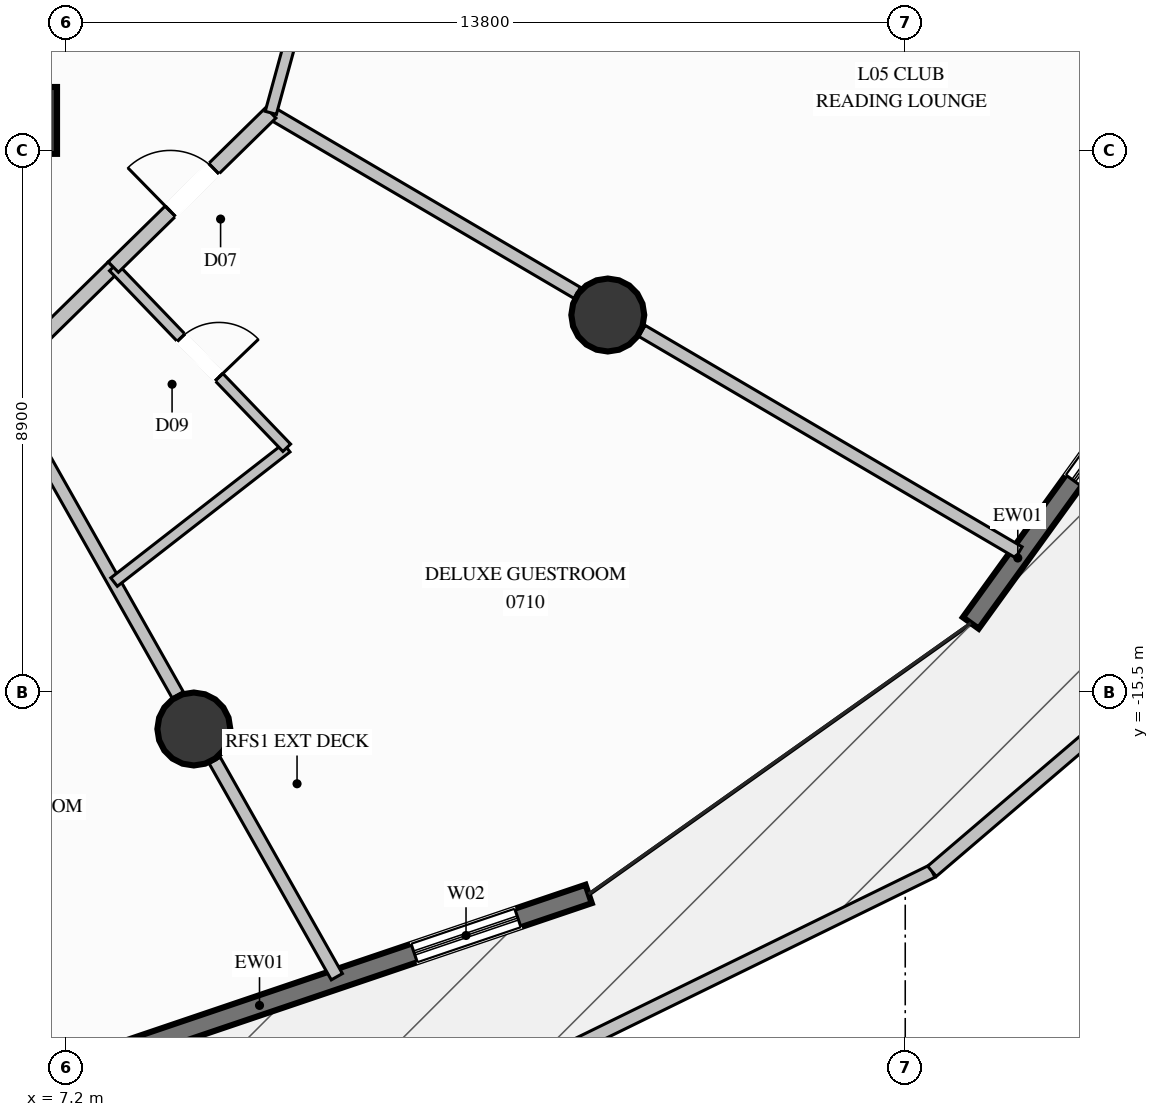
"""IFC4 building model, lengths in metres.
Left out: names, types, materials, properties, quantities, classifications, styles, units other than length and angle.
Written with IfcOpenShell. Run it as: python <this file> out.ifc"""

import sys

from ifc_helpers import new_model, si_unit, direction, frame, frame_2d, origin, origin_2d, place, context, subcontext, project, spatial, rectangle, circle, extrude, element, fill, save


model = new_model("IFC4")
c1 = context("Model", 3, precision=1e-05, world=origin(), true_north=direction((0.0, 1.0)))
c2 = subcontext(c1, "Body", "Model", "MODEL_VIEW")
j1 = project(units=[si_unit("LENGTHUNIT", "METRE"), si_unit("PLANEANGLEUNIT", "RADIAN")], contexts=[c1])
p1 = place(None, origin())
s1 = spatial("IfcSite", under=j1, at=p1, CompositionType="ELEMENT")
p2 = place(p1, origin())
s2 = spatial("IfcBuilding", under=s1, at=p2, CompositionType="ELEMENT")
p3 = place(p2, frame((0.0, 0.0, 28.4)))
s3 = spatial("IfcBuildingStorey", under=s2, at=p3, CompositionType="ELEMENT", Elevation=28.4)
p4 = place(p3, frame((6.5, -6.1, 0.0), z_axis=(0.0, 0.0, 1.0), x_axis=(1.0, 0.0, 0.0)))
e1 = element("IfcColumn", 1, at=p4, inside=s3, PredefinedType="COLUMN", context=c2, shape_type="SweptSolid", body=[
    extrude(rectangle(XDim=1.1, YDim=1.1, at=origin_2d()), origin(), (0.0, 0.0, 1.0), 3.6),
])
for number, where, z_axis, x_axis in (
    (2, (9.3, -16.108, 0.0), (0.0, 0.0, 1.0), (1.0, 0.0, 0.0)),
    (3, (16.108, -9.3, 0.0), (0.0, 0.0, 1.0), (1.0, 0.0, 0.0)),
):
    element("IfcColumn", number, at=place(p3, frame(where, z_axis=z_axis, x_axis=x_axis)), inside=s3, PredefinedType="COLUMN", context=c2, shape_type="SweptSolid", body=[
        extrude(circle(Radius=0.6, at=origin_2d()), origin(), (0.0, 0.0, 1.0), 3.6),
    ])
p5 = place(p3, frame((15.793, -18.821, 0.0), z_axis=(0.0, 0.0, 1.0), x_axis=(-0.94717495877, -0.320717317085, 0.0)))
e4 = element("IfcWall", 4, at=p5, inside=s3, PredefinedType="SOLIDWALL", context=c2, shape_type="SweptSolid", body=[
    extrude(rectangle(XDim=8.151, YDim=0.32, at=frame_2d((4.075, 0.0))), origin(), (0.0, 0.0, 1.0), 3.34),
])
p6 = place(p5, frame((1.229, 0.0, 0.35)))
e5 = element("IfcOpeningElement", 5, at=p6, cuts=e4, PredefinedType="OPENING", context=c2, shape_type="SweptSolid", body=[
    extrude(rectangle(XDim=1.8, YDim=2.6, at=frame_2d((0.9, 1.3))), frame((0.0, 0.17, 0.0), z_axis=(0.0, -1.0, 0.0), x_axis=(1.0, 0.0, 0.0)), (0.0, 0.0, 1.0), 0.34),
])
p7 = place(p3, frame((26.316, -8.503, 0.0), z_axis=(0.0, 0.0, 1.0), x_axis=(-0.585883584877, -0.810395227634, 0.0)))
e6 = element("IfcWall", 6, at=p7, inside=s3, PredefinedType="SOLIDWALL", context=c2, shape_type="SweptSolid", body=[
    extrude(rectangle(XDim=7.234, YDim=0.32, at=frame_2d((3.617, 0.0))), origin(), (0.0, 0.0, 1.0), 3.34),
])
p8 = place(p7, frame((2.545, 0.0, 0.35)))
e7 = element("IfcOpeningElement", 7, at=p8, cuts=e6, PredefinedType="OPENING", context=c2, shape_type="SweptSolid", body=[
    extrude(rectangle(XDim=1.8, YDim=2.6, at=frame_2d((0.9, 1.3))), frame((0.0, 0.17, 0.0), z_axis=(0.0, -1.0, 0.0), x_axis=(1.0, 0.0, 0.0)), (0.0, 0.0, 1.0), 0.34),
])
p9 = place(p3, frame((14.572, -21.809, 0.0), z_axis=(0.0, 0.0, 1.0), x_axis=(0.898207066033, 0.439572595289, 0.0)))
e8 = element("IfcWall", 8, at=p9, inside=s3, PredefinedType="PARAPET", context=c2, shape_type="SweptSolid", body=[
    extrude(rectangle(XDim=7.646, YDim=0.22, at=frame_2d((3.823, 0.0))), origin(), (0.0, 0.0, 1.0), 1.15),
])
p10 = place(p3, frame((21.44, -18.448, 0.0), z_axis=(0.0, 0.0, 1.0), x_axis=(0.760343653317, 0.649520999553, 0.0)))
e9 = element("IfcWall", 9, at=p10, inside=s3, PredefinedType="PARAPET", context=c2, shape_type="SweptSolid", body=[
    extrude(rectangle(XDim=7.111, YDim=0.22, at=frame_2d((3.556, 0.0))), origin(), (0.0, 0.0, 1.0), 1.15),
])
p11 = place(p3, frame((6.1, -10.349, 0.0), z_axis=(0.0, 0.0, 1.0), x_axis=(0.491652896219, -0.870791266401, 0.0)))
e10 = element("IfcWall", 10, at=p11, inside=s3, PredefinedType="PARTITIONING", context=c2, shape_type="SweptSolid", body=[
    extrude(rectangle(XDim=5.969, YDim=0.21, at=frame_2d((2.985, 0.0))), origin(), (0.0, 0.0, 1.0), 2.708),
])
p12 = place(p3, frame((9.643, -16.624, 0.0), z_axis=(0.0, 0.0, 1.0), x_axis=(0.491698874435, -0.87076530528, 0.0)))
e11 = element("IfcWall", 11, at=p12, inside=s3, PredefinedType="PARTITIONING", context=c2, shape_type="SweptSolid", body=[
    extrude(rectangle(XDim=4.086, YDim=0.21, at=frame_2d((2.043, 0.0))), origin(), (0.0, 0.0, 1.0), 3.34),
])
p13 = place(p3, frame((10.566, -5.975, 0.0), z_axis=(0.0, 0.0, 1.0), x_axis=(0.862217531027, -0.506538181374, 0.0)))
e12 = element("IfcWall", 12, at=p13, inside=s3, PredefinedType="PARTITIONING", context=c2, shape_type="SweptSolid", body=[
    extrude(rectangle(XDim=5.845, YDim=0.21, at=frame_2d((2.923, 0.0))), origin(), (0.0, 0.0, 1.0), 2.708),
])
p14 = place(p3, frame((16.67, -9.561, 0.0), z_axis=(0.0, 0.0, 1.0), x_axis=(0.862214298177, -0.506543684215, 0.0)))
e13 = element("IfcWall", 13, at=p14, inside=s3, PredefinedType="PARTITIONING", context=c2, shape_type="SweptSolid", body=[
    extrude(rectangle(XDim=7.19, YDim=0.21, at=frame_2d((3.595, 0.0))), origin(), (0.0, 0.0, 1.0), 3.34),
])
p15 = place(p3, frame((6.1, -10.349, 0.0), z_axis=(0.0, 0.0, 1.0), x_axis=(0.714460071513, 0.69967621527, 0.0)))
e14 = element("IfcWall", 14, at=p15, inside=s3, PredefinedType="PARTITIONING", context=c2, shape_type="SweptSolid", body=[
    extrude(rectangle(XDim=2.626, YDim=0.24, at=frame_2d((1.313, 0.0))), origin(), (0.0, 0.0, 1.0), 3.34),
])
p16 = place(p3, frame((7.988, -13.692, 0.0), z_axis=(0.0, 0.0, 1.0), x_axis=(0.78932298539, 0.613978195651, 0.0)))
e15 = element("IfcWall", 15, at=p16, inside=s3, PredefinedType="PLUMBINGWALL", context=c2, shape_type="SweptSolid", body=[
    extrude(rectangle(XDim=3.598, YDim=0.175, at=frame_2d((1.799, 0.0))), origin(), (0.0, 0.0, 1.0), 3.34),
])
p17 = place(p3, frame((7.976, -8.512, 0.0), z_axis=(0.0, 0.0, 1.0), x_axis=(0.692493571669, -0.721424045342, 0.0)))
e16 = element("IfcWall", 16, at=p17, inside=s3, PredefinedType="PLUMBINGWALL", context=c2, shape_type="SweptSolid", body=[
    extrude(rectangle(XDim=4.118, YDim=0.175, at=frame_2d((2.059, 0.0))), origin(), (0.0, 0.0, 1.0), 3.34),
])
p18 = place(p17, frame((1.609, 0.0, 0.0)))
e17 = element("IfcOpeningElement", 17, at=p18, cuts=e16, PredefinedType="OPENING", context=c2, shape_type="SweptSolid", body=[
    extrude(rectangle(XDim=0.9, YDim=2.1, at=frame_2d((0.45, 1.05))), frame((0.0, 0.098, 0.0), z_axis=(0.0, -1.0, 0.0), x_axis=(1.0, 0.0, 0.0)), (0.0, 0.0, 1.0), 0.195),
])
p19 = place(p3, frame((7.976, -8.512, 0.0), z_axis=(0.0, 0.0, 1.0), x_axis=(0.714375756875, 0.699762301064, 0.0)))
e18 = element("IfcWall", 18, at=p19, inside=s3, PredefinedType="PARTITIONING", context=c2, shape_type="SweptSolid", body=[
    extrude(rectangle(XDim=3.625, YDim=0.24, at=frame_2d((1.812, 0.0))), origin(), (0.0, 0.0, 1.0), 3.34),
])
p20 = place(p19, frame((1.313, 0.0, 0.0)))
e19 = element("IfcOpeningElement", 19, at=p20, cuts=e18, PredefinedType="OPENING", context=c2, shape_type="SweptSolid", body=[
    extrude(rectangle(XDim=1.0, YDim=2.2, at=frame_2d((0.5, 1.1))), frame((0.0, 0.13, 0.0), z_axis=(0.0, -1.0, 0.0), x_axis=(1.0, 0.0, 0.0)), (0.0, 0.0, 1.0), 0.26),
])
p21 = place(p3, frame((10.566, -5.975, 0.0), z_axis=(0.0, 0.0, 1.0), x_axis=(0.263787657435, 0.964580775148, 0.0)))
e20 = element("IfcWall", 20, at=p21, inside=s3, PredefinedType="PARTITIONING", context=c2, shape_type="SweptSolid", body=[
    extrude(rectangle(XDim=6.195, YDim=0.19, at=frame_2d((3.097, 0.0))), origin(), (0.0, 0.0, 1.0), 2.919),
])
p22 = place(p21, frame((2.622, 0.0, 0.0)))
e21 = element("IfcOpeningElement", 21, at=p22, cuts=e20, PredefinedType="OPENING", context=c2, shape_type="SweptSolid", body=[
    extrude(rectangle(XDim=0.95, YDim=2.1, at=frame_2d((0.475, 1.05))), frame((0.0, 0.105, 0.0), z_axis=(0.0, -1.0, 0.0), x_axis=(1.0, 0.0, 0.0)), (0.0, 0.0, 1.0), 0.21),
])
p23 = place(p6, origin())
e22 = element("IfcWindow", 22, at=p23, inside=s3, PartitioningType="SINGLE_PANEL", PredefinedType="WINDOW", context=c2, shape_type="SweptSolid", body=[
    extrude(rectangle(XDim=1.8, YDim=2.6, at=frame_2d((0.9, 1.3))), frame((0.0, 0.03, 0.0), z_axis=(0.0, -1.0, 0.0), x_axis=(1.0, 0.0, 0.0)), (0.0, 0.0, 1.0), 0.06),
])
fill(e5, e22)
p24 = place(p8, origin())
e23 = element("IfcWindow", 23, at=p24, inside=s3, PartitioningType="SINGLE_PANEL", PredefinedType="WINDOW", context=c2, shape_type="SweptSolid", body=[
    extrude(rectangle(XDim=1.8, YDim=2.6, at=frame_2d((0.9, 1.3))), frame((0.0, 0.03, 0.0), z_axis=(0.0, -1.0, 0.0), x_axis=(1.0, 0.0, 0.0)), (0.0, 0.0, 1.0), 0.06),
])
fill(e7, e23)
p25 = place(p18, origin())
e24 = element("IfcDoor", 24, at=p25, inside=s3, OperationType="SINGLE_SWING_RIGHT", PredefinedType="DOOR", context=c2, shape_type="SweptSolid", body=[
    extrude(rectangle(XDim=0.9, YDim=2.1, at=frame_2d((0.45, 1.05))), frame((0.0, 0.025, 0.0), z_axis=(0.0, -1.0, 0.0), x_axis=(1.0, 0.0, 0.0)), (0.0, 0.0, 1.0), 0.05),
])
fill(e17, e24)
p26 = place(p20, origin())
e25 = element("IfcDoor", 25, at=p26, inside=s3, OperationType="SINGLE_SWING_LEFT", PredefinedType="DOOR", context=c2, shape_type="SweptSolid", body=[
    extrude(rectangle(XDim=1.0, YDim=2.2, at=frame_2d((0.5, 1.1))), frame((0.0, 0.025, 0.0), z_axis=(0.0, -1.0, 0.0), x_axis=(1.0, 0.0, 0.0)), (0.0, 0.0, 1.0), 0.05),
])
fill(e19, e25)
save(model, sys.argv[1])
